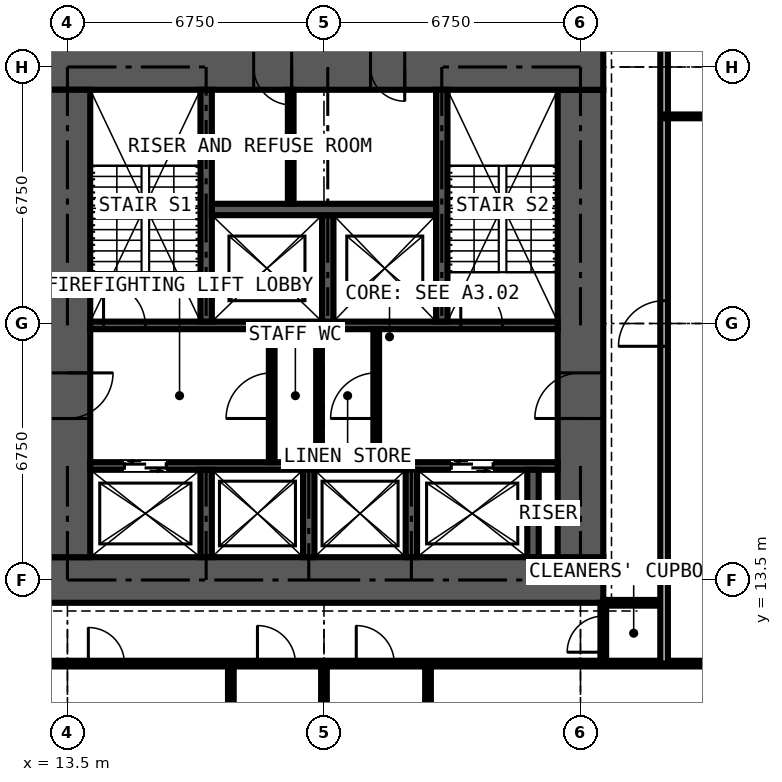
"""IFC4 building model, lengths in metres.
Left out: names, types, materials, properties, quantities, classifications, styles, units other than length and angle.
Written with IfcOpenShell. Run it as: python <this file> out.ifc"""

import sys

from ifc_helpers import new_model, si_unit, direction, frame, frame_2d, origin, place, context, subcontext, project, spatial, rectangle, extrude, element, fill, save


model = new_model("IFC4")
c1 = context("Model", 3, precision=1e-05, world=origin(), true_north=direction((0.0, 1.0)))
c2 = subcontext(c1, "Body", "Model", "MODEL_VIEW")
j1 = project(units=[si_unit("LENGTHUNIT", "METRE"), si_unit("PLANEANGLEUNIT", "RADIAN")], contexts=[c1])
p1 = place(None, origin())
s1 = spatial("IfcSite", under=j1, at=p1, CompositionType="ELEMENT")
p2 = place(p1, origin())
s2 = spatial("IfcBuilding", under=s1, at=p2, CompositionType="ELEMENT")
p3 = place(p2, frame((0.0, 0.0, 32.4)))
s3 = spatial("IfcBuildingStorey", under=s2, at=p3, CompositionType="ELEMENT", Elevation=32.4)
p4 = place(p3, frame((12.9, 13.5, 0.0), z_axis=(0.0, 0.0, 1.0), x_axis=(1.0, 0.0, 0.0)))
e1 = element("IfcWall", 1, at=p4, inside=s3, PredefinedType="SHEAR", context=c2, shape_type="SweptSolid", body=[
    extrude(rectangle(XDim=14.7, YDim=1.2, at=frame_2d((7.35, 0.0))), origin(), (0.0, 0.0, 1.0), 3.6),
])
p5 = place(p3, frame((27.0, 14.1, 0.0), z_axis=(0.0, 0.0, 1.0), x_axis=(0.0, 1.0, 0.0)))
e2 = element("IfcWall", 2, at=p5, inside=s3, PredefinedType="SHEAR", context=c2, shape_type="SweptSolid", body=[
    extrude(rectangle(XDim=12.3, YDim=1.2, at=frame_2d((6.15, 0.0))), origin(), (0.0, 0.0, 1.0), 3.6),
])
p6 = place(p5, frame((3.65, 0.0, 0.0)))
e3 = element("IfcOpeningElement", 3, at=p6, cuts=e2, PredefinedType="OPENING", context=c2, shape_type="SweptSolid", body=[
    extrude(rectangle(XDim=1.2, YDim=2.2, at=frame_2d((0.6, 1.1))), frame((0.0, 0.61, 0.0), z_axis=(0.0, -1.0, 0.0), x_axis=(1.0, 0.0, 0.0)), (0.0, 0.0, 1.0), 1.22),
])
p7 = place(p3, frame((27.6, 27.0, 0.0), z_axis=(0.0, 0.0, 1.0), x_axis=(-1.0, 0.0, 0.0)))
e4 = element("IfcWall", 4, at=p7, inside=s3, PredefinedType="SHEAR", context=c2, shape_type="SweptSolid", body=[
    extrude(rectangle(XDim=14.7, YDim=1.2, at=frame_2d((7.35, 0.0))), origin(), (0.0, 0.0, 1.0), 3.6),
])
p8 = place(p7, frame((5.225, 0.0, 0.0)))
e5 = element("IfcOpeningElement", 5, at=p8, cuts=e4, PredefinedType="OPENING", context=c2, shape_type="SweptSolid", body=[
    extrude(rectangle(XDim=0.9, YDim=2.2, at=frame_2d((0.45, 1.1))), frame((0.0, 0.61, 0.0), z_axis=(0.0, -1.0, 0.0), x_axis=(1.0, 0.0, 0.0)), (0.0, 0.0, 1.0), 1.22),
])
p9 = place(p7, frame((8.2, 0.0, 0.0)))
e6 = element("IfcOpeningElement", 6, at=p9, cuts=e4, PredefinedType="OPENING", context=c2, shape_type="SweptSolid", body=[
    extrude(rectangle(XDim=1.0, YDim=2.2, at=frame_2d((0.5, 1.1))), frame((0.0, 0.61, 0.0), z_axis=(0.0, -1.0, 0.0), x_axis=(1.0, 0.0, 0.0)), (0.0, 0.0, 1.0), 1.22),
])
p10 = place(p3, frame((13.5, 26.4, 0.0), z_axis=(0.0, 0.0, 1.0), x_axis=(0.0, -1.0, 0.0)))
e7 = element("IfcWall", 7, at=p10, inside=s3, PredefinedType="SHEAR", context=c2, shape_type="SweptSolid", body=[
    extrude(rectangle(XDim=12.3, YDim=1.2, at=frame_2d((6.15, 0.0))), origin(), (0.0, 0.0, 1.0), 3.6),
])
p11 = place(p10, frame((7.45, 0.0, 0.0)))
e8 = element("IfcOpeningElement", 8, at=p11, cuts=e7, PredefinedType="OPENING", context=c2, shape_type="SweptSolid", body=[
    extrude(rectangle(XDim=1.2, YDim=2.2, at=frame_2d((0.6, 1.1))), frame((0.0, 0.61, 0.0), z_axis=(0.0, -1.0, 0.0), x_axis=(1.0, 0.0, 0.0)), (0.0, 0.0, 1.0), 1.22),
])
p12 = place(p3, frame((14.1, 16.5, 0.0), z_axis=(0.0, 0.0, 1.0), x_axis=(1.0, 0.0, 0.0)))
e9 = element("IfcWall", 9, at=p12, inside=s3, PredefinedType="SHEAR", context=c2, shape_type="SweptSolid", body=[
    extrude(rectangle(XDim=12.3, YDim=0.2, at=frame_2d((6.15, 0.0))), origin(), (0.0, 0.0, 1.0), 3.6),
])
p13 = place(p12, frame((0.9, 0.0, 0.0)))
e10 = element("IfcOpeningElement", 10, at=p13, cuts=e9, PredefinedType="OPENING", context=c2, shape_type="SweptSolid", body=[
    extrude(rectangle(XDim=1.1, YDim=2.2, at=frame_2d((0.55, 1.1))), frame((0.0, 0.11, 0.0), z_axis=(0.0, -1.0, 0.0), x_axis=(1.0, 0.0, 0.0)), (0.0, 0.0, 1.0), 0.22),
])
p14 = place(p12, frame((9.5, 0.0, 0.0)))
e11 = element("IfcOpeningElement", 11, at=p14, cuts=e9, PredefinedType="OPENING", context=c2, shape_type="SweptSolid", body=[
    extrude(rectangle(XDim=1.1, YDim=2.2, at=frame_2d((0.55, 1.1))), frame((0.0, 0.11, 0.0), z_axis=(0.0, -1.0, 0.0), x_axis=(1.0, 0.0, 0.0)), (0.0, 0.0, 1.0), 0.22),
])
p15 = place(p3, frame((14.1, 20.2, 0.0), z_axis=(0.0, 0.0, 1.0), x_axis=(1.0, 0.0, 0.0)))
e12 = element("IfcWall", 12, at=p15, inside=s3, PredefinedType="SHEAR", context=c2, shape_type="SweptSolid", body=[
    extrude(rectangle(XDim=12.3, YDim=0.2, at=frame_2d((6.15, 0.0))), origin(), (0.0, 0.0, 1.0), 3.6),
])
p16 = place(p15, frame((0.35, 0.0, 0.0)))
e13 = element("IfcOpeningElement", 13, at=p16, cuts=e12, PredefinedType="OPENING", context=c2, shape_type="SweptSolid", body=[
    extrude(rectangle(XDim=1.1, YDim=2.2, at=frame_2d((0.55, 1.1))), frame((0.0, 0.11, 0.0), z_axis=(0.0, -1.0, 0.0), x_axis=(1.0, 0.0, 0.0)), (0.0, 0.0, 1.0), 0.22),
])
p17 = place(p15, frame((9.75, 0.0, 0.0)))
e14 = element("IfcOpeningElement", 14, at=p17, cuts=e12, PredefinedType="OPENING", context=c2, shape_type="SweptSolid", body=[
    extrude(rectangle(XDim=1.1, YDim=2.2, at=frame_2d((0.55, 1.1))), frame((0.0, 0.11, 0.0), z_axis=(0.0, -1.0, 0.0), x_axis=(1.0, 0.0, 0.0)), (0.0, 0.0, 1.0), 0.22),
])
for number, where, z_axis, x_axis in (
    (15, (17.15, 20.3, 0.0), (0.0, 0.0, 1.0), (0.0, 1.0, 0.0)),
    (16, (23.35, 20.3, 0.0), (0.0, 0.0, 1.0), (0.0, 1.0, 0.0)),
):
    element("IfcWall", number, at=place(p3, frame(where, z_axis=z_axis, x_axis=x_axis)), inside=s3, PredefinedType="SHEAR", context=c2, shape_type="SweptSolid", body=[
        extrude(rectangle(XDim=6.1, YDim=0.3, at=frame_2d((3.05, 0.0))), origin(), (0.0, 0.0, 1.0), 3.6),
    ])
p18 = place(p3, frame((20.35, 20.3, 0.0), z_axis=(0.0, 0.0, 1.0), x_axis=(0.0, 1.0, 0.0)))
e17 = element("IfcWall", 17, at=p18, inside=s3, PredefinedType="SHEAR", context=c2, shape_type="SweptSolid", body=[
    extrude(rectangle(XDim=2.8, YDim=0.3, at=frame_2d((1.4, 0.0))), origin(), (0.0, 0.0, 1.0), 3.6),
])
p19 = place(p3, frame((17.3, 23.25, 0.0), z_axis=(0.0, 0.0, 1.0), x_axis=(1.0, 0.0, 0.0)))
e18 = element("IfcWall", 18, at=p19, inside=s3, PredefinedType="SHEAR", context=c2, shape_type="SweptSolid", body=[
    extrude(rectangle(XDim=5.9, YDim=0.3, at=frame_2d((2.95, 0.0))), origin(), (0.0, 0.0, 1.0), 3.6),
])
for number, where, z_axis, x_axis in (
    (19, (17.15, 14.1, 0.0), (0.0, 0.0, 1.0), (0.0, 1.0, 0.0)),
    (20, (19.85, 14.1, 0.0), (0.0, 0.0, 1.0), (0.0, 1.0, 0.0)),
    (21, (22.55, 14.1, 0.0), (0.0, 0.0, 1.0), (0.0, 1.0, 0.0)),
    (22, (25.75, 14.1, 0.0), (0.0, 0.0, 1.0), (0.0, 1.0, 0.0)),
):
    element("IfcWall", number, at=place(p3, frame(where, z_axis=z_axis, x_axis=x_axis)), inside=s3, PredefinedType="SHEAR", context=c2, shape_type="SweptSolid", body=[
        extrude(rectangle(XDim=2.3, YDim=0.3, at=frame_2d((1.15, 0.0))), origin(), (0.0, 0.0, 1.0), 3.6),
    ])
p20 = place(p3, frame((18.875, 16.6, 0.0), z_axis=(0.0, 0.0, 1.0), x_axis=(0.0, 1.0, 0.0)))
e23 = element("IfcWall", 23, at=p20, inside=s3, PredefinedType="PARTITIONING", context=c2, shape_type="SweptSolid", body=[
    extrude(rectangle(XDim=3.5, YDim=0.15, at=frame_2d((1.75, 0.0))), origin(), (0.0, 0.0, 1.0), 3.375),
])
p21 = place(p20, frame((1.15, 0.0, 0.0)))
e24 = element("IfcOpeningElement", 24, at=p21, cuts=e23, PredefinedType="OPENING", context=c2, shape_type="SweptSolid", body=[
    extrude(rectangle(XDim=1.2, YDim=2.2, at=frame_2d((0.6, 1.1))), frame((0.0, 0.085, 0.0), z_axis=(0.0, -1.0, 0.0), x_axis=(1.0, 0.0, 0.0)), (0.0, 0.0, 1.0), 0.17),
])
p22 = place(p3, frame((21.625, 16.6, 0.0), z_axis=(0.0, 0.0, 1.0), x_axis=(0.0, 1.0, 0.0)))
e25 = element("IfcWall", 25, at=p22, inside=s3, PredefinedType="PARTITIONING", context=c2, shape_type="SweptSolid", body=[
    extrude(rectangle(XDim=3.5, YDim=0.15, at=frame_2d((1.75, 0.0))), origin(), (0.0, 0.0, 1.0), 3.375),
])
p23 = place(p22, frame((1.15, 0.0, 0.0)))
e26 = element("IfcOpeningElement", 26, at=p23, cuts=e25, PredefinedType="OPENING", context=c2, shape_type="SweptSolid", body=[
    extrude(rectangle(XDim=1.2, YDim=2.2, at=frame_2d((0.6, 1.1))), frame((0.0, 0.085, 0.0), z_axis=(0.0, -1.0, 0.0), x_axis=(1.0, 0.0, 0.0)), (0.0, 0.0, 1.0), 0.17),
])
p24 = place(p3, frame((20.12, 16.6, 0.0), z_axis=(0.0, 0.0, 1.0), x_axis=(0.0, 1.0, 0.0)))
e27 = element("IfcWall", 27, at=p24, inside=s3, PredefinedType="PARTITIONING", context=c2, shape_type="SweptSolid", body=[
    extrude(rectangle(XDim=3.5, YDim=0.15, at=frame_2d((1.75, 0.0))), origin(), (0.0, 0.0, 1.0), 3.375),
])
p25 = place(p3, frame((19.375, 23.4, 0.0), z_axis=(0.0, 0.0, 1.0), x_axis=(0.0, 1.0, 0.0)))
e28 = element("IfcWall", 28, at=p25, inside=s3, PredefinedType="PARTITIONING", context=c2, shape_type="SweptSolid", body=[
    extrude(rectangle(XDim=3.0, YDim=0.15, at=frame_2d((1.5, 0.0))), origin(), (0.0, 0.0, 1.0), 3.375),
])
p26 = place(p3, frame((10.125, 11.3, 0.0), z_axis=(0.0, 0.0, 1.0), x_axis=(1.0, 0.0, 0.0)))
e29 = element("IfcWall", 29, at=p26, inside=s3, PredefinedType="PARTITIONING", context=c2, shape_type="SweptSolid", body=[
    extrude(rectangle(XDim=20.675, YDim=0.15, at=frame_2d((10.337, 0.0))), origin(), (0.0, 0.0, 1.0), 3.375),
])
p27 = place(p26, frame((8.375, 0.0, 0.0)))
e30 = element("IfcOpeningElement", 30, at=p27, cuts=e29, PredefinedType="OPENING", context=c2, shape_type="SweptSolid", body=[
    extrude(rectangle(XDim=1.0, YDim=2.2, at=frame_2d((0.5, 1.1))), frame((0.0, 0.085, 0.0), z_axis=(0.0, -1.0, 0.0), x_axis=(1.0, 0.0, 0.0)), (0.0, 0.0, 1.0), 0.17),
])
p28 = place(p26, frame((10.975, 0.0, 0.0)))
e31 = element("IfcOpeningElement", 31, at=p28, cuts=e29, PredefinedType="OPENING", context=c2, shape_type="SweptSolid", body=[
    extrude(rectangle(XDim=1.0, YDim=2.2, at=frame_2d((0.5, 1.1))), frame((0.0, 0.085, 0.0), z_axis=(0.0, -1.0, 0.0), x_axis=(1.0, 0.0, 0.0)), (0.0, 0.0, 1.0), 0.17),
])
p29 = place(p26, frame((3.925, 0.0, 0.0)))
e32 = element("IfcOpeningElement", 32, at=p29, cuts=e29, PredefinedType="OPENING", context=c2, shape_type="SweptSolid", body=[
    extrude(rectangle(XDim=0.95, YDim=2.2, at=frame_2d((0.475, 1.1))), frame((0.0, 0.085, 0.0), z_axis=(0.0, -1.0, 0.0), x_axis=(1.0, 0.0, 0.0)), (0.0, 0.0, 1.0), 0.17),
])
p30 = place(p3, frame((17.8, 5.65, 0.0), z_axis=(0.0, 0.0, 1.0), x_axis=(0.0, 1.0, 0.0)))
e33 = element("IfcWall", 33, at=p30, inside=s3, PredefinedType="PARTITIONING", context=c2, shape_type="SweptSolid", body=[
    extrude(rectangle(XDim=5.65, YDim=0.15, at=frame_2d((2.825, 0.0))), origin(), (0.0, 0.0, 1.0), 3.375),
])
p31 = place(p3, frame((20.25, -0.734, 0.0), z_axis=(0.0, 0.0, 1.0), x_axis=(0.0, 1.0, 0.0)))
e34 = element("IfcWall", 34, at=p31, inside=s3, PredefinedType="PARTITIONING", context=c2, shape_type="SweptSolid", body=[
    extrude(rectangle(XDim=12.034, YDim=0.15, at=frame_2d((6.017, 0.0))), origin(), (0.0, 0.0, 1.0), 2.61),
])
p32 = place(p3, frame((22.988, 5.65, 0.0), z_axis=(0.0, 0.0, 1.0), x_axis=(0.0, 1.0, 0.0)))
e35 = element("IfcWall", 35, at=p32, inside=s3, PredefinedType="PARTITIONING", context=c2, shape_type="SweptSolid", body=[
    extrude(rectangle(XDim=5.65, YDim=0.15, at=frame_2d((2.825, 0.0))), origin(), (0.0, 0.0, 1.0), 3.375),
])
p33 = place(p3, frame((27.6, 11.3, 0.0), z_axis=(0.0, 0.0, 1.0), x_axis=(0.0, 1.0, 0.0)))
e36 = element("IfcWall", 36, at=p33, inside=s3, PredefinedType="PARTITIONING", context=c2, shape_type="SweptSolid", body=[
    extrude(rectangle(XDim=1.6, YDim=0.15, at=frame_2d((0.8, 0.0))), origin(), (0.0, 0.0, 1.0), 3.375),
])
p34 = place(p33, frame((0.3, 0.0, 0.0)))
e37 = element("IfcOpeningElement", 37, at=p34, cuts=e36, PredefinedType="OPENING", context=c2, shape_type="SweptSolid", body=[
    extrude(rectangle(XDim=0.95, YDim=2.2, at=frame_2d((0.475, 1.1))), frame((0.0, 0.085, 0.0), z_axis=(0.0, -1.0, 0.0), x_axis=(1.0, 0.0, 0.0)), (0.0, 0.0, 1.0), 0.17),
])
p35 = place(p3, frame((27.6, 12.9, 0.0), z_axis=(0.0, 0.0, 1.0), x_axis=(1.0, 0.0, 0.0)))
e38 = element("IfcWall", 38, at=p35, inside=s3, PredefinedType="PARTITIONING", context=c2, shape_type="SweptSolid", body=[
    extrude(rectangle(XDim=1.6, YDim=0.15, at=frame_2d((0.8, 0.0))), origin(), (0.0, 0.0, 1.0), 2.877),
])
p36 = place(p3, frame((29.2, 11.3, 0.0), z_axis=(0.0, 0.0, 1.0), x_axis=(0.0, 1.0, 0.0)))
e39 = element("IfcWall", 39, at=p36, inside=s3, PredefinedType="PARTITIONING", context=c2, shape_type="SweptSolid", body=[
    extrude(rectangle(XDim=17.9, YDim=0.2, at=frame_2d((8.95, 0.0))), origin(), (0.0, 0.0, 1.0), 3.375),
])
p37 = place(p36, frame((8.35, 0.0, 0.0)))
e40 = element("IfcOpeningElement", 40, at=p37, cuts=e39, PredefinedType="OPENING", context=c2, shape_type="SweptSolid", body=[
    extrude(rectangle(XDim=1.2, YDim=2.2, at=frame_2d((0.6, 1.1))), frame((0.0, 0.11, 0.0), z_axis=(0.0, -1.0, 0.0), x_axis=(1.0, 0.0, 0.0)), (0.0, 0.0, 1.0), 0.22),
])
p38 = place(p3, frame((29.2, 25.7, 0.0), z_axis=(0.0, 0.0, 1.0), x_axis=(1.0, 0.0, 0.0)))
e41 = element("IfcWall", 41, at=p38, inside=s3, PredefinedType="SHEAR", context=c2, shape_type="SweptSolid", body=[
    extrude(rectangle(XDim=3.45, YDim=0.1, at=frame_2d((1.725, 0.0))), origin(), (0.0, 0.0, 1.0), 3.375),
])
p39 = place(p13, origin())
e42 = element("IfcDoor", 42, at=p39, inside=s3, OperationType="DOUBLE_DOOR_SLIDING", PredefinedType="DOOR", context=c2, shape_type="SweptSolid", body=[
    extrude(rectangle(XDim=1.1, YDim=2.2, at=frame_2d((0.55, 1.1))), frame((0.0, 0.025, 0.0), z_axis=(0.0, -1.0, 0.0), x_axis=(1.0, 0.0, 0.0)), (0.0, 0.0, 1.0), 0.05),
])
fill(e10, e42)
p40 = place(p14, origin())
e43 = element("IfcDoor", 43, at=p40, inside=s3, OperationType="DOUBLE_DOOR_SLIDING", PredefinedType="DOOR", context=c2, shape_type="SweptSolid", body=[
    extrude(rectangle(XDim=1.1, YDim=2.2, at=frame_2d((0.55, 1.1))), frame((0.0, 0.025, 0.0), z_axis=(0.0, -1.0, 0.0), x_axis=(1.0, 0.0, 0.0)), (0.0, 0.0, 1.0), 0.05),
])
fill(e11, e43)
p41 = place(p11, origin())
e44 = element("IfcDoor", 44, at=p41, inside=s3, OperationType="DOUBLE_DOOR_SINGLE_SWING", PredefinedType="DOOR", context=c2, shape_type="SweptSolid", body=[
    extrude(rectangle(XDim=1.2, YDim=2.2, at=frame_2d((0.6, 1.1))), frame((0.0, 0.025, 0.0), z_axis=(0.0, -1.0, 0.0), x_axis=(1.0, 0.0, 0.0)), (0.0, 0.0, 1.0), 0.05),
])
fill(e8, e44)
p42 = place(p6, origin())
e45 = element("IfcDoor", 45, at=p42, inside=s3, OperationType="DOUBLE_DOOR_SINGLE_SWING", PredefinedType="DOOR", context=c2, shape_type="SweptSolid", body=[
    extrude(rectangle(XDim=1.2, YDim=2.2, at=frame_2d((0.6, 1.1))), frame((0.0, 0.025, 0.0), z_axis=(0.0, -1.0, 0.0), x_axis=(1.0, 0.0, 0.0)), (0.0, 0.0, 1.0), 0.05),
])
fill(e3, e45)
p43 = place(p21, origin())
e46 = element("IfcDoor", 46, at=p43, inside=s3, OperationType="DOUBLE_DOOR_SINGLE_SWING", PredefinedType="DOOR", context=c2, shape_type="SweptSolid", body=[
    extrude(rectangle(XDim=1.2, YDim=2.2, at=frame_2d((0.6, 1.1))), frame((0.0, 0.025, 0.0), z_axis=(0.0, -1.0, 0.0), x_axis=(1.0, 0.0, 0.0)), (0.0, 0.0, 1.0), 0.05),
])
fill(e24, e46)
p44 = place(p23, origin())
e47 = element("IfcDoor", 47, at=p44, inside=s3, OperationType="DOUBLE_DOOR_SINGLE_SWING", PredefinedType="DOOR", context=c2, shape_type="SweptSolid", body=[
    extrude(rectangle(XDim=1.2, YDim=2.2, at=frame_2d((0.6, 1.1))), frame((0.0, 0.025, 0.0), z_axis=(0.0, -1.0, 0.0), x_axis=(1.0, 0.0, 0.0)), (0.0, 0.0, 1.0), 0.05),
])
fill(e26, e47)
p45 = place(p8, origin())
e48 = element("IfcDoor", 48, at=p45, inside=s3, OperationType="SINGLE_SWING_LEFT", PredefinedType="DOOR", context=c2, shape_type="SweptSolid", body=[
    extrude(rectangle(XDim=0.9, YDim=2.2, at=frame_2d((0.45, 1.1))), frame((0.0, 0.4, 0.0), z_axis=(0.0, -1.0, 0.0), x_axis=(1.0, 0.0, 0.0)), (0.0, 0.0, 1.0), 0.8),
])
fill(e5, e48)
p46 = place(p9, origin())
e49 = element("IfcDoor", 49, at=p46, inside=s3, OperationType="SINGLE_SWING_LEFT", PredefinedType="DOOR", context=c2, shape_type="SweptSolid", body=[
    extrude(rectangle(XDim=1.0, YDim=2.2, at=frame_2d((0.5, 1.1))), frame((0.0, 0.025, 0.0), z_axis=(0.0, -1.0, 0.0), x_axis=(1.0, 0.0, 0.0)), (0.0, 0.0, 1.0), 0.05),
])
fill(e6, e49)
p47 = place(p16, origin())
e50 = element("IfcDoor", 50, at=p47, inside=s3, OperationType="SINGLE_SWING_LEFT", PredefinedType="DOOR", context=c2, shape_type="SweptSolid", body=[
    extrude(rectangle(XDim=1.1, YDim=2.2, at=frame_2d((0.55, 1.1))), frame((0.0, 0.025, 0.0), z_axis=(0.0, -1.0, 0.0), x_axis=(1.0, 0.0, 0.0)), (0.0, 0.0, 1.0), 0.05),
])
fill(e13, e50)
p48 = place(p17, origin())
e51 = element("IfcDoor", 51, at=p48, inside=s3, OperationType="SINGLE_SWING_LEFT", PredefinedType="DOOR", context=c2, shape_type="SweptSolid", body=[
    extrude(rectangle(XDim=1.1, YDim=2.2, at=frame_2d((0.55, 1.1))), frame((0.0, 0.025, 0.0), z_axis=(0.0, -1.0, 0.0), x_axis=(1.0, 0.0, 0.0)), (0.0, 0.0, 1.0), 0.05),
])
fill(e14, e51)
p49 = place(p34, origin())
e52 = element("IfcDoor", 52, at=p49, inside=s3, OperationType="SINGLE_SWING_LEFT", PredefinedType="DOOR", context=c2, shape_type="SweptSolid", body=[
    extrude(rectangle(XDim=0.95, YDim=2.2, at=frame_2d((0.475, 1.1))), frame((0.0, 0.025, 0.0), z_axis=(0.0, -1.0, 0.0), x_axis=(1.0, 0.0, 0.0)), (0.0, 0.0, 1.0), 0.05),
])
fill(e37, e52)
p50 = place(p27, origin())
e53 = element("IfcDoor", 53, at=p50, inside=s3, OperationType="SINGLE_SWING_LEFT", PredefinedType="DOOR", context=c2, shape_type="SweptSolid", body=[
    extrude(rectangle(XDim=1.0, YDim=2.2, at=frame_2d((0.5, 1.1))), frame((0.0, 0.025, 0.0), z_axis=(0.0, -1.0, 0.0), x_axis=(1.0, 0.0, 0.0)), (0.0, 0.0, 1.0), 0.05),
])
fill(e30, e53)
p51 = place(p28, origin())
e54 = element("IfcDoor", 54, at=p51, inside=s3, OperationType="SINGLE_SWING_LEFT", PredefinedType="DOOR", context=c2, shape_type="SweptSolid", body=[
    extrude(rectangle(XDim=1.0, YDim=2.2, at=frame_2d((0.5, 1.1))), frame((0.0, 0.025, 0.0), z_axis=(0.0, -1.0, 0.0), x_axis=(1.0, 0.0, 0.0)), (0.0, 0.0, 1.0), 0.05),
])
fill(e31, e54)
p52 = place(p29, origin())
e55 = element("IfcDoor", 55, at=p52, inside=s3, OperationType="SINGLE_SWING_LEFT", PredefinedType="DOOR", context=c2, shape_type="SweptSolid", body=[
    extrude(rectangle(XDim=0.95, YDim=2.2, at=frame_2d((0.475, 1.1))), frame((0.0, 0.025, 0.0), z_axis=(0.0, -1.0, 0.0), x_axis=(1.0, 0.0, 0.0)), (0.0, 0.0, 1.0), 0.05),
])
fill(e32, e55)
p53 = place(p37, origin())
e56 = element("IfcDoor", 56, at=p53, inside=s3, OperationType="DOUBLE_DOOR_SINGLE_SWING", PredefinedType="DOOR", context=c2, shape_type="SweptSolid", body=[
    extrude(rectangle(XDim=1.2, YDim=2.2, at=frame_2d((0.6, 1.1))), frame((0.0, 0.025, 0.0), z_axis=(0.0, -1.0, 0.0), x_axis=(1.0, 0.0, 0.0)), (0.0, 0.0, 1.0), 0.05),
])
fill(e40, e56)
save(model, sys.argv[1])
